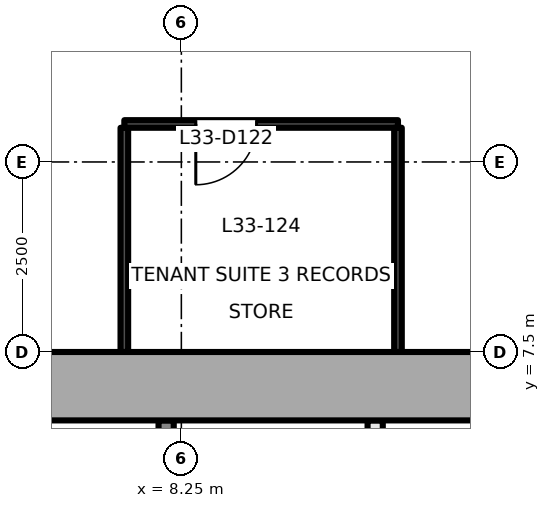
"""IFC4 building model, lengths in metres.
Left out: names, types, materials, properties, quantities, classifications, styles, units other than length and angle.
Written with IfcOpenShell. Run it as: python <this file> out.ifc"""

import sys

from ifc_helpers import new_model, si_unit, direction, frame, frame_2d, origin, place, context, subcontext, project, spatial, rectangle, extrude, element, fill, save


model = new_model("IFC4")
c1 = context("Model", 3, precision=1e-05, world=origin(), true_north=direction((0.0, 1.0)))
c2 = subcontext(c1, "Body", "Model", "MODEL_VIEW")
j1 = project(units=[si_unit("LENGTHUNIT", "METRE"), si_unit("PLANEANGLEUNIT", "RADIAN")], contexts=[c1])
p1 = place(None, origin())
s1 = spatial("IfcSite", under=j1, at=p1, CompositionType="ELEMENT")
p2 = place(p1, origin())
s2 = spatial("IfcBuilding", under=s1, at=p2, CompositionType="ELEMENT")
p3 = place(p2, frame((0.0, 0.0, 146.1)))
s3 = spatial("IfcBuildingStorey", under=s2, at=p3, CompositionType="ELEMENT", Elevation=146.1)
p4 = place(p3, frame((-18.0, 7.05, -0.2), z_axis=(0.0, 0.0, 1.0), x_axis=(1.0, 0.0, 0.0)))
e1 = element("IfcWall", 1, at=p4, inside=s3, PredefinedType="SHEAR", context=c2, shape_type="SweptSolid", body=[
    extrude(rectangle(XDim=36.0, YDim=0.9, at=frame_2d((18.0, 0.0))), origin(), (0.0, 0.0, 1.0), 4.0),
])
p5 = place(p3, frame((8.05, -6.6, 0.0), z_axis=(0.0, 0.0, 1.0), x_axis=(0.0, 1.0, 0.0)))
e2 = element("IfcWall", 2, at=p5, inside=s3, PredefinedType="PARTITIONING", context=c2, shape_type="SweptSolid", body=[
    extrude(rectangle(XDim=13.2, YDim=0.2, at=frame_2d((6.6, 0.0))), origin(), (0.0, 0.0, 1.0), 3.8),
])
p6 = place(p5, frame((0.91, 0.0, 0.0)))
e3 = element("IfcOpeningElement", 3, at=p6, cuts=e2, PredefinedType="OPENING", context=c2, shape_type="SweptSolid", body=[
    extrude(rectangle(XDim=0.9, YDim=2.1, at=frame_2d((0.45, 1.05))), frame((0.0, 0.111, 0.0), z_axis=(0.0, -1.0, 0.0), x_axis=(1.0, 0.0, 0.0)), (0.0, 0.0, 1.0), 0.221),
])
p7 = place(p5, frame((3.46, 0.0, 0.0)))
e4 = element("IfcOpeningElement", 4, at=p7, cuts=e2, PredefinedType="OPENING", context=c2, shape_type="SweptSolid", body=[
    extrude(rectangle(XDim=0.9, YDim=2.1, at=frame_2d((0.45, 1.05))), frame((0.0, 0.111, 0.0), z_axis=(0.0, -1.0, 0.0), x_axis=(1.0, 0.0, 0.0)), (0.0, 0.0, 1.0), 0.221),
])
p8 = place(p5, frame((5.5, 0.0, 0.0)))
e5 = element("IfcOpeningElement", 5, at=p8, cuts=e2, PredefinedType="OPENING", context=c2, shape_type="SweptSolid", body=[
    extrude(rectangle(XDim=0.9, YDim=2.1, at=frame_2d((0.45, 1.05))), frame((0.0, 0.111, 0.0), z_axis=(0.0, -1.0, 0.0), x_axis=(1.0, 0.0, 0.0)), (0.0, 0.0, 1.0), 0.221),
])
p9 = place(p5, frame((11.9, 0.0, 0.0)))
e6 = element("IfcOpeningElement", 6, at=p9, cuts=e2, PredefinedType="OPENING", context=c2, shape_type="SweptSolid", body=[
    extrude(rectangle(XDim=1.1, YDim=2.1, at=frame_2d((0.55, 1.05))), frame((0.0, 0.111, 0.0), z_axis=(0.0, -1.0, 0.0), x_axis=(1.0, 0.0, 0.0)), (0.0, 0.0, 1.0), 0.221),
])
p10 = place(p3, frame((10.8, -6.6, 0.0), z_axis=(0.0, 0.0, 1.0), x_axis=(0.0, 1.0, 0.0)))
e7 = element("IfcWall", 7, at=p10, inside=s3, PredefinedType="PARTITIONING", context=c2, shape_type="SweptSolid", body=[
    extrude(rectangle(XDim=13.2, YDim=0.2, at=frame_2d((6.6, 0.0))), origin(), (0.0, 0.0, 1.0), 3.8),
])
p11 = place(p10, frame((0.7, 0.0, 0.0)))
e8 = element("IfcOpeningElement", 8, at=p11, cuts=e7, PredefinedType="OPENING", context=c2, shape_type="SweptSolid", body=[
    extrude(rectangle(XDim=1.2, YDim=2.1, at=frame_2d((0.6, 1.05))), frame((0.0, 0.111, 0.0), z_axis=(0.0, -1.0, 0.0), x_axis=(1.0, 0.0, 0.0)), (0.0, 0.0, 1.0), 0.221),
])
p12 = place(p10, frame((9.15, 0.0, 0.0)))
e9 = element("IfcOpeningElement", 9, at=p12, cuts=e7, PredefinedType="OPENING", context=c2, shape_type="SweptSolid", body=[
    extrude(rectangle(XDim=0.9, YDim=2.1, at=frame_2d((0.45, 1.05))), frame((0.0, 0.111, 0.0), z_axis=(0.0, -1.0, 0.0), x_axis=(1.0, 0.0, 0.0)), (0.0, 0.0, 1.0), 0.221),
])
p13 = place(p10, frame((11.55, 0.0, 0.0)))
e10 = element("IfcOpeningElement", 10, at=p13, cuts=e7, PredefinedType="OPENING", context=c2, shape_type="SweptSolid", body=[
    extrude(rectangle(XDim=0.9, YDim=2.1, at=frame_2d((0.45, 1.05))), frame((0.0, 0.111, 0.0), z_axis=(0.0, -1.0, 0.0), x_axis=(1.0, 0.0, 0.0)), (0.0, 0.0, 1.0), 0.221),
])
p14 = place(p3, frame((7.5, 10.45, 0.0), z_axis=(0.0, 0.0, 1.0), x_axis=(0.0, -1.0, 0.0)))
e11 = element("IfcWall", 11, at=p14, inside=s3, PredefinedType="PARTITIONING", context=c2, shape_type="SweptSolid", body=[
    extrude(rectangle(XDim=2.95, YDim=0.1, at=frame_2d((1.475, 0.0))), origin(), (0.0, 0.0, 1.0), 3.8),
])
p15 = place(p3, frame((11.1, 10.5, 0.0), z_axis=(0.0, 0.0, 1.0), x_axis=(-1.0, 0.0, 0.0)))
e12 = element("IfcWall", 12, at=p15, inside=s3, PredefinedType="PARTITIONING", context=c2, shape_type="SweptSolid", body=[
    extrude(rectangle(XDim=3.6, YDim=0.1, at=frame_2d((1.8, 0.0))), origin(), (0.0, 0.0, 1.0), 3.5),
])
p16 = place(p15, frame((1.86, 0.0, 0.0)))
e13 = element("IfcOpeningElement", 13, at=p16, cuts=e12, PredefinedType="OPENING", context=c2, shape_type="SweptSolid", body=[
    extrude(rectangle(XDim=0.8, YDim=2.1, at=frame_2d((0.4, 1.05))), frame((0.0, 0.061, 0.0), z_axis=(0.0, -1.0, 0.0), x_axis=(1.0, 0.0, 0.0)), (0.0, 0.0, 1.0), 0.121),
])
p17 = place(p3, frame((11.1, 7.5, 0.0), z_axis=(0.0, 0.0, 1.0), x_axis=(0.0, 1.0, 0.0)))
e14 = element("IfcWall", 14, at=p17, inside=s3, PredefinedType="PARTITIONING", context=c2, shape_type="SweptSolid", body=[
    extrude(rectangle(XDim=2.95, YDim=0.1, at=frame_2d((1.475, 0.0))), origin(), (0.0, 0.0, 1.0), 3.8),
])
p18 = place(p16, origin())
e15 = element("IfcDoor", 15, at=p18, inside=s3, OperationType="SINGLE_SWING_RIGHT", PredefinedType="DOOR", context=c2, shape_type="SweptSolid", body=[
    extrude(rectangle(XDim=0.8, YDim=2.1, at=frame_2d((0.4, 1.05))), frame((0.0, 0.025, 0.0), z_axis=(0.0, -1.0, 0.0), x_axis=(1.0, 0.0, 0.0)), (0.0, 0.0, 1.0), 0.05),
])
fill(e13, e15)
save(model, sys.argv[1])
